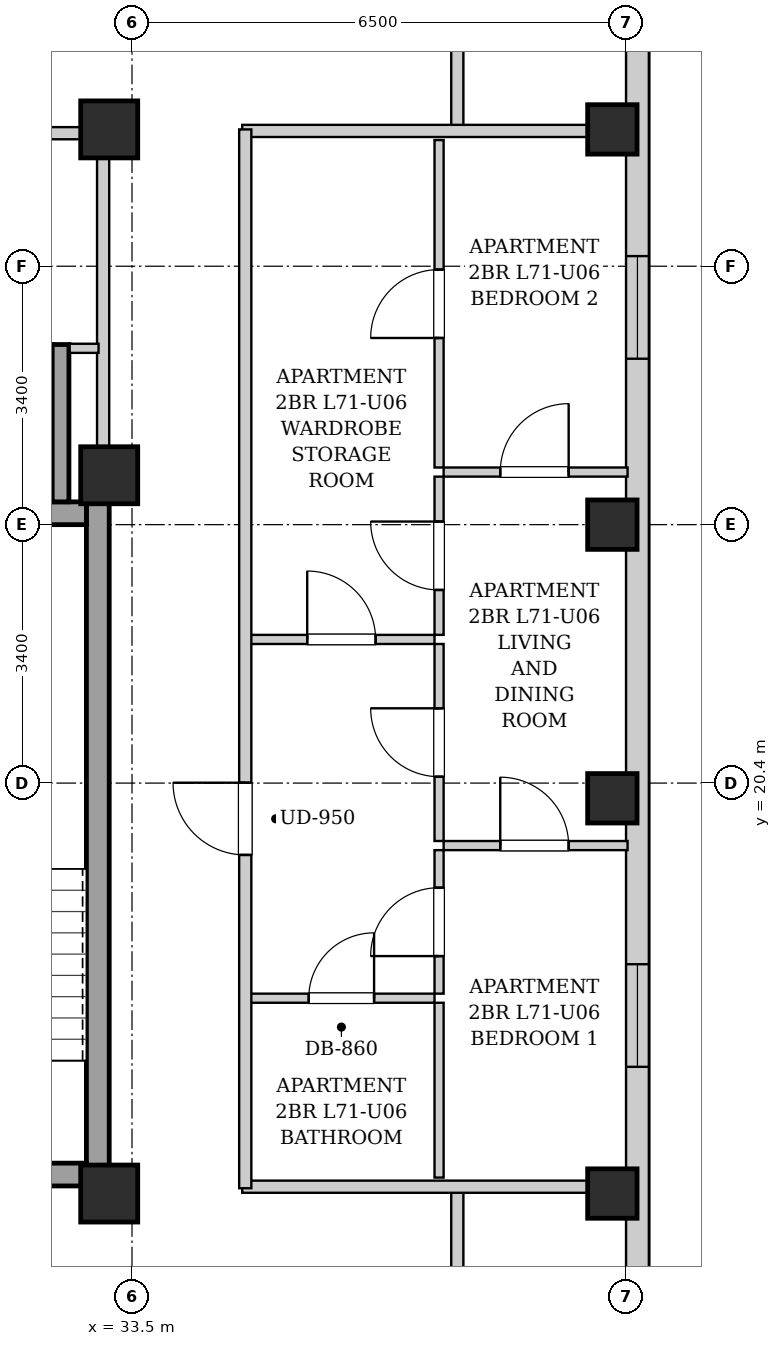
"""IFC4 building model, lengths in metres.
Left out: names, types, materials, properties, quantities, classifications, styles, units other than length and angle.
Written with IfcOpenShell. Run it as: python <this file> out.ifc"""

import sys

from ifc_helpers import new_model, si_unit, direction, frame, frame_2d, origin, origin_2d, place, context, subcontext, project, spatial, rectangle, extrude, element, fill, save


model = new_model("IFC4")
c1 = context("Model", 3, precision=1e-05, world=origin(), true_north=direction((0.0, 1.0)))
c2 = subcontext(c1, "Body", "Model", "MODEL_VIEW")
j1 = project(units=[si_unit("LENGTHUNIT", "METRE"), si_unit("PLANEANGLEUNIT", "RADIAN")], contexts=[c1])
p1 = place(None, origin())
s1 = spatial("IfcSite", under=j1, at=p1, CompositionType="ELEMENT")
p2 = place(p1, origin())
s2 = spatial("IfcBuilding", under=s1, at=p2, CompositionType="ELEMENT")
p3 = place(p2, frame((0.0, 0.0, 244.5)))
s3 = spatial("IfcBuildingStorey", under=s2, at=p3, CompositionType="ELEMENT", Elevation=244.5)
for number, where, z_axis, x_axis in (
    (1, (39.82, 15.0, 0.0), (0.0, 0.0, 1.0), (1.0, 0.0, 0.0)),
    (2, (39.82, 20.2, 0.0), (0.0, 0.0, 1.0), (1.0, 0.0, 0.0)),
    (3, (39.82, 23.8, 0.0), (0.0, 0.0, 1.0), (1.0, 0.0, 0.0)),
    (4, (39.82, 29.0, 0.0), (0.0, 0.0, 1.0), (1.0, 0.0, 0.0)),
):
    element("IfcColumn", number, at=place(p3, frame(where, z_axis=z_axis, x_axis=x_axis)), inside=s3, PredefinedType="COLUMN", context=c2, shape_type="SweptSolid", body=[
        extrude(rectangle(XDim=0.65, YDim=0.65, at=origin_2d()), origin(), (0.0, 0.0, 1.0), 3.4),
    ])
for number, where, z_axis, x_axis in (
    (5, (33.2, 15.0, 0.0), (0.0, 0.0, 1.0), (1.0, 0.0, 0.0)),
    (6, (33.2, 29.0, 0.0), (0.0, 0.0, 1.0), (1.0, 0.0, 0.0)),
    (7, (33.2, 24.45, 0.0), (0.0, 0.0, 1.0), (1.0, 0.0, 0.0)),
):
    element("IfcColumn", number, at=place(p3, frame(where, z_axis=z_axis, x_axis=x_axis)), inside=s3, PredefinedType="COLUMN", context=c2, shape_type="SweptSolid", body=[
        extrude(rectangle(XDim=0.75, YDim=0.75, at=origin_2d()), origin(), (0.0, 0.0, 1.0), 3.4),
    ])
p4 = place(p3, frame((40.15, 37.7, 0.0), z_axis=(0.0, 0.0, 1.0), x_axis=(0.0, -1.0, 0.0)))
e8 = element("IfcWall", 8, at=p4, inside=s3, PredefinedType="SOLIDWALL", context=c2, shape_type="SweptSolid", body=[
    extrude(rectangle(XDim=31.4, YDim=0.3, at=frame_2d((15.7, 0.0))), origin(), (0.0, 0.0, 1.0), 3.14),
])
p5 = place(p4, frame((28.396, 0.0, 0.55)))
e9 = element("IfcOpeningElement", 9, at=p5, cuts=e8, PredefinedType="OPENING", context=c2, shape_type="SweptSolid", body=[
    extrude(rectangle(XDim=1.35, YDim=1.2, at=frame_2d((0.675, 0.6))), frame((0.0, 0.16, 0.0), z_axis=(0.0, -1.0, 0.0), x_axis=(1.0, 0.0, 0.0)), (0.0, 0.0, 1.0), 0.32),
])
p6 = place(p4, frame((1.653, 0.0, 0.55)))
e10 = element("IfcOpeningElement", 10, at=p6, cuts=e8, PredefinedType="OPENING", context=c2, shape_type="SweptSolid", body=[
    extrude(rectangle(XDim=1.35, YDim=1.2, at=frame_2d((0.675, 0.6))), frame((0.0, 0.16, 0.0), z_axis=(0.0, -1.0, 0.0), x_axis=(1.0, 0.0, 0.0)), (0.0, 0.0, 1.0), 0.32),
])
p7 = place(p4, frame((19.683, 0.0, 0.55)))
e11 = element("IfcOpeningElement", 11, at=p7, cuts=e8, PredefinedType="OPENING", context=c2, shape_type="SweptSolid", body=[
    extrude(rectangle(XDim=1.35, YDim=1.2, at=frame_2d((0.675, 0.6))), frame((0.0, 0.16, 0.0), z_axis=(0.0, -1.0, 0.0), x_axis=(1.0, 0.0, 0.0)), (0.0, 0.0, 1.0), 0.32),
])
p8 = place(p4, frame((10.367, 0.0, 0.55)))
e12 = element("IfcOpeningElement", 12, at=p8, cuts=e8, PredefinedType="OPENING", context=c2, shape_type="SweptSolid", body=[
    extrude(rectangle(XDim=1.35, YDim=1.2, at=frame_2d((0.675, 0.6))), frame((0.0, 0.16, 0.0), z_axis=(0.0, -1.0, 0.0), x_axis=(1.0, 0.0, 0.0)), (0.0, 0.0, 1.0), 0.32),
])
p9 = place(p3, frame((33.05, 15.1, 0.0), z_axis=(0.0, 0.0, 1.0), x_axis=(0.0, 1.0, 0.0)))
e13 = element("IfcWall", 13, at=p9, inside=s3, PredefinedType="SHEAR", context=c2, shape_type="SweptSolid", body=[
    extrude(rectangle(XDim=9.0, YDim=0.3, at=frame_2d((4.5, 0.0))), origin(), (0.0, 0.0, 1.0), 3.14),
])
p10 = place(p3, frame((30.05, 23.95, 0.0), z_axis=(0.0, 0.0, 1.0), x_axis=(1.0, 0.0, 0.0)))
e14 = element("IfcWall", 14, at=p10, inside=s3, PredefinedType="SHEAR", context=c2, shape_type="SweptSolid", body=[
    extrude(rectangle(XDim=2.85, YDim=0.3, at=frame_2d((1.425, 0.0))), origin(), (0.0, 0.0, 1.0), 3.14),
])
p11 = place(p3, frame((30.05, 15.25, 0.0), z_axis=(0.0, 0.0, 1.0), x_axis=(1.0, 0.0, 0.0)))
e15 = element("IfcWall", 15, at=p11, inside=s3, PredefinedType="SHEAR", context=c2, shape_type="SweptSolid", body=[
    extrude(rectangle(XDim=2.85, YDim=0.3, at=frame_2d((1.425, 0.0))), origin(), (0.0, 0.0, 1.0), 3.14),
])
p12 = place(p11, frame((0.86, 0.0, 0.0)))
e16 = element("IfcOpeningElement", 16, at=p12, cuts=e15, PredefinedType="OPENING", context=c2, shape_type="SweptSolid", body=[
    extrude(rectangle(XDim=1.1, YDim=2.05, at=frame_2d((0.55, 1.025))), frame((0.0, 0.16, 0.0), z_axis=(0.0, -1.0, 0.0), x_axis=(1.0, 0.0, 0.0)), (0.0, 0.0, 1.0), 0.32),
])
p13 = place(p3, frame((32.56, 24.1, 0.0), z_axis=(0.0, 0.0, 1.0), x_axis=(0.0, 1.0, 0.0)))
e17 = element("IfcWall", 17, at=p13, inside=s3, PredefinedType="SHEAR", context=c2, shape_type="SweptSolid", body=[
    extrude(rectangle(XDim=2.07, YDim=0.22, at=frame_2d((1.035, 0.0))), origin(), (0.0, 0.0, 1.0), 3.14),
])
p14 = place(p3, frame((33.12, 24.12, 0.0), z_axis=(0.0, 0.0, 1.0), x_axis=(0.0, 1.0, 0.0)))
e18 = element("IfcWall", 18, at=p14, inside=s3, PredefinedType="PARTITIONING", context=c2, shape_type="SweptSolid", body=[
    extrude(rectangle(XDim=4.76, YDim=0.16, at=frame_2d((2.38, 0.0))), origin(), (0.0, 0.0, 1.0), 3.14),
])
p15 = place(p3, frame((32.68, 26.12, 0.0), z_axis=(0.0, 0.0, 1.0), x_axis=(1.0, 0.0, 0.0)))
e19 = element("IfcWall", 19, at=p15, inside=s3, PredefinedType="PARTITIONING", context=c2, shape_type="SweptSolid", body=[
    extrude(rectangle(XDim=0.38, YDim=0.12, at=frame_2d((0.19, 0.0))), origin(), (0.0, 0.0, 1.0), 3.14),
])
p16 = place(p3, frame((30.08, 28.95, 0.0), z_axis=(0.0, 0.0, 1.0), x_axis=(1.0, 0.0, 0.0)))
e20 = element("IfcWall", 20, at=p16, inside=s3, PredefinedType="PARTITIONING", context=c2, shape_type="SweptSolid", body=[
    extrude(rectangle(XDim=2.96, YDim=0.16, at=frame_2d((1.48, 0.0))), origin(), (0.0, 0.0, 1.0), 3.14),
])
p17 = place(p16, frame((1.045, 0.0, 0.0)))
e21 = element("IfcOpeningElement", 21, at=p17, cuts=e20, PredefinedType="OPENING", context=c2, shape_type="SweptSolid", body=[
    extrude(rectangle(XDim=0.86, YDim=2.05, at=frame_2d((0.43, 1.025))), frame((0.0, 0.09, 0.0), z_axis=(0.0, -1.0, 0.0), x_axis=(1.0, 0.0, 0.0)), (0.0, 0.0, 1.0), 0.18),
])
for number, where, z_axis, x_axis in (
    (22, (37.78, 13.51, 0.0), (0.0, 0.0, 1.0), (0.0, 1.0, 0.0)),
    (23, (37.78, 28.98, 0.0), (0.0, 0.0, 1.0), (0.0, 1.0, 0.0)),
):
    element("IfcWall", number, at=place(p3, frame(where, z_axis=z_axis, x_axis=x_axis)), inside=s3, PredefinedType="PARTITIONING", context=c2, shape_type="SweptSolid", body=[
        extrude(rectangle(XDim=1.58, YDim=0.16, at=frame_2d((0.79, 0.0))), origin(), (0.0, 0.0, 1.0), 3.14),
    ])
for number, where, z_axis, x_axis in (
    (24, (34.95, 15.09, 0.0), (0.0, 0.0, 1.0), (1.0, 0.0, 0.0)),
    (25, (34.95, 28.98, 0.0), (0.0, 0.0, 1.0), (1.0, 0.0, 0.0)),
):
    element("IfcWall", number, at=place(p3, frame(where, z_axis=z_axis, x_axis=x_axis)), inside=s3, PredefinedType="PARTITIONING", context=c2, shape_type="SweptSolid", body=[
        extrude(rectangle(XDim=5.07, YDim=0.16, at=frame_2d((2.535, 0.0))), origin(), (0.0, 0.0, 1.0), 2.668),
    ])
p18 = place(p3, frame((35.03, 22.29, 0.0), z_axis=(0.0, 0.0, 1.0), x_axis=(1.0, 0.0, 0.0)))
e26 = element("IfcWall", 26, at=p18, inside=s3, PredefinedType="PARTITIONING", context=c2, shape_type="SweptSolid", body=[
    extrude(rectangle(XDim=2.45, YDim=0.12, at=frame_2d((1.225, 0.0))), origin(), (0.0, 0.0, 1.0), 3.14),
])
p19 = place(p18, frame((0.775, 0.0, 0.0)))
e27 = element("IfcOpeningElement", 27, at=p19, cuts=e26, PredefinedType="OPENING", context=c2, shape_type="SweptSolid", body=[
    extrude(rectangle(XDim=0.9, YDim=2.05, at=frame_2d((0.45, 1.025))), frame((0.0, 0.07, 0.0), z_axis=(0.0, -1.0, 0.0), x_axis=(1.0, 0.0, 0.0)), (0.0, 0.0, 1.0), 0.14),
])
p20 = place(p3, frame((37.54, 22.35, 0.0), z_axis=(0.0, 0.0, 1.0), x_axis=(0.0, 1.0, 0.0)))
e28 = element("IfcWall", 28, at=p20, inside=s3, PredefinedType="PARTITIONING", context=c2, shape_type="SweptSolid", body=[
    extrude(rectangle(XDim=2.082, YDim=0.12, at=frame_2d((1.041, 0.0))), origin(), (0.0, 0.0, 1.0), 3.14),
])
p21 = place(p20, frame((0.591, 0.0, 0.0)))
e29 = element("IfcOpeningElement", 29, at=p21, cuts=e28, PredefinedType="OPENING", context=c2, shape_type="SweptSolid", body=[
    extrude(rectangle(XDim=0.9, YDim=2.05, at=frame_2d((0.45, 1.025))), frame((0.0, 0.07, 0.0), z_axis=(0.0, -1.0, 0.0), x_axis=(1.0, 0.0, 0.0)), (0.0, 0.0, 1.0), 0.14),
])
p22 = place(p3, frame((37.54, 24.552, 0.0), z_axis=(0.0, 0.0, 1.0), x_axis=(0.0, 1.0, 0.0)))
e30 = element("IfcWall", 30, at=p22, inside=s3, PredefinedType="PARTITIONING", context=c2, shape_type="SweptSolid", body=[
    extrude(rectangle(XDim=4.308, YDim=0.12, at=frame_2d((2.154, 0.0))), origin(), (0.0, 0.0, 1.0), 3.14),
])
p23 = place(p22, frame((1.704, 0.0, 0.0)))
e31 = element("IfcOpeningElement", 31, at=p23, cuts=e30, PredefinedType="OPENING", context=c2, shape_type="SweptSolid", body=[
    extrude(rectangle(XDim=0.9, YDim=2.05, at=frame_2d((0.45, 1.025))), frame((0.0, 0.07, 0.0), z_axis=(0.0, -1.0, 0.0), x_axis=(1.0, 0.0, 0.0)), (0.0, 0.0, 1.0), 0.14),
])
p24 = place(p3, frame((35.03, 17.57, 0.0), z_axis=(0.0, 0.0, 1.0), x_axis=(1.0, 0.0, 0.0)))
e32 = element("IfcWall", 32, at=p24, inside=s3, PredefinedType="PARTITIONING", context=c2, shape_type="SweptSolid", body=[
    extrude(rectangle(XDim=2.45, YDim=0.12, at=frame_2d((1.225, 0.0))), origin(), (0.0, 0.0, 1.0), 3.14),
])
p25 = place(p24, frame((0.795, 0.0, 0.0)))
e33 = element("IfcOpeningElement", 33, at=p25, cuts=e32, PredefinedType="OPENING", context=c2, shape_type="SweptSolid", body=[
    extrude(rectangle(XDim=0.86, YDim=2.05, at=frame_2d((0.43, 1.025))), frame((0.0, 0.07, 0.0), z_axis=(0.0, -1.0, 0.0), x_axis=(1.0, 0.0, 0.0)), (0.0, 0.0, 1.0), 0.14),
])
p26 = place(p3, frame((37.54, 15.21, 0.0), z_axis=(0.0, 0.0, 1.0), x_axis=(0.0, 1.0, 0.0)))
e34 = element("IfcWall", 34, at=p26, inside=s3, PredefinedType="PARTITIONING", context=c2, shape_type="SweptSolid", body=[
    extrude(rectangle(XDim=2.3, YDim=0.12, at=frame_2d((1.15, 0.0))), origin(), (0.0, 0.0, 1.0), 3.14),
])
p27 = place(p3, frame((37.54, 17.63, 0.0), z_axis=(0.0, 0.0, 1.0), x_axis=(0.0, 1.0, 0.0)))
e35 = element("IfcWall", 35, at=p27, inside=s3, PredefinedType="PARTITIONING", context=c2, shape_type="SweptSolid", body=[
    extrude(rectangle(XDim=1.888, YDim=0.12, at=frame_2d((0.944, 0.0))), origin(), (0.0, 0.0, 1.0), 3.14),
])
p28 = place(p27, frame((0.494, 0.0, 0.0)))
e36 = element("IfcOpeningElement", 36, at=p28, cuts=e35, PredefinedType="OPENING", context=c2, shape_type="SweptSolid", body=[
    extrude(rectangle(XDim=0.9, YDim=2.05, at=frame_2d((0.45, 1.025))), frame((0.0, 0.07, 0.0), z_axis=(0.0, -1.0, 0.0), x_axis=(1.0, 0.0, 0.0)), (0.0, 0.0, 1.0), 0.14),
])
p29 = place(p3, frame((37.54, 19.638, 0.0), z_axis=(0.0, 0.0, 1.0), x_axis=(0.0, 1.0, 0.0)))
e37 = element("IfcWall", 37, at=p29, inside=s3, PredefinedType="PARTITIONING", context=c2, shape_type="SweptSolid", body=[
    extrude(rectangle(XDim=2.592, YDim=0.12, at=frame_2d((1.296, 0.0))), origin(), (0.0, 0.0, 1.0), 3.14),
])
p30 = place(p29, frame((0.846, 0.0, 0.0)))
e38 = element("IfcOpeningElement", 38, at=p30, cuts=e37, PredefinedType="OPENING", context=c2, shape_type="SweptSolid", body=[
    extrude(rectangle(XDim=0.9, YDim=2.05, at=frame_2d((0.45, 1.025))), frame((0.0, 0.07, 0.0), z_axis=(0.0, -1.0, 0.0), x_axis=(1.0, 0.0, 0.0)), (0.0, 0.0, 1.0), 0.14),
])
p31 = place(p3, frame((37.6, 19.578, 0.0), z_axis=(0.0, 0.0, 1.0), x_axis=(1.0, 0.0, 0.0)))
e39 = element("IfcWall", 39, at=p31, inside=s3, PredefinedType="PARTITIONING", context=c2, shape_type="SweptSolid", body=[
    extrude(rectangle(XDim=2.42, YDim=0.12, at=frame_2d((1.21, 0.0))), origin(), (0.0, 0.0, 1.0), 3.14),
])
p32 = place(p31, frame((0.745, 0.0, 0.0)))
e40 = element("IfcOpeningElement", 40, at=p32, cuts=e39, PredefinedType="OPENING", context=c2, shape_type="SweptSolid", body=[
    extrude(rectangle(XDim=0.9, YDim=2.05, at=frame_2d((0.45, 1.025))), frame((0.0, 0.07, 0.0), z_axis=(0.0, -1.0, 0.0), x_axis=(1.0, 0.0, 0.0)), (0.0, 0.0, 1.0), 0.14),
])
p33 = place(p3, frame((37.6, 24.492, 0.0), z_axis=(0.0, 0.0, 1.0), x_axis=(1.0, 0.0, 0.0)))
e41 = element("IfcWall", 41, at=p33, inside=s3, PredefinedType="PARTITIONING", context=c2, shape_type="SweptSolid", body=[
    extrude(rectangle(XDim=2.42, YDim=0.12, at=frame_2d((1.21, 0.0))), origin(), (0.0, 0.0, 1.0), 2.878),
])
p34 = place(p33, frame((0.745, 0.0, 0.0)))
e42 = element("IfcOpeningElement", 42, at=p34, cuts=e41, PredefinedType="OPENING", context=c2, shape_type="SweptSolid", body=[
    extrude(rectangle(XDim=0.9, YDim=2.05, at=frame_2d((0.45, 1.025))), frame((0.0, 0.07, 0.0), z_axis=(0.0, -1.0, 0.0), x_axis=(1.0, 0.0, 0.0)), (0.0, 0.0, 1.0), 0.14),
])
p35 = place(p3, frame((34.99, 15.07, 0.0), z_axis=(0.0, 0.0, 1.0), x_axis=(0.0, 1.0, 0.0)))
e43 = element("IfcWall", 43, at=p35, inside=s3, PredefinedType="PARTITIONING", context=c2, shape_type="SweptSolid", body=[
    extrude(rectangle(XDim=13.93, YDim=0.16, at=frame_2d((6.965, 0.0))), origin(), (0.0, 0.0, 1.0), 3.14),
])
p36 = place(p35, frame((4.385, 0.0, 0.0)))
e44 = element("IfcOpeningElement", 44, at=p36, cuts=e43, PredefinedType="OPENING", context=c2, shape_type="SweptSolid", body=[
    extrude(rectangle(XDim=0.95, YDim=2.1, at=frame_2d((0.475, 1.05))), frame((0.0, 0.09, 0.0), z_axis=(0.0, -1.0, 0.0), x_axis=(1.0, 0.0, 0.0)), (0.0, 0.0, 1.0), 0.18),
])
p37 = place(p19, origin())
e45 = element("IfcDoor", 45, at=p37, inside=s3, OperationType="SINGLE_SWING_LEFT", PredefinedType="DOOR", context=c2, shape_type="SweptSolid", body=[
    extrude(rectangle(XDim=0.9, YDim=2.05, at=frame_2d((0.45, 1.025))), frame((0.0, 0.025, 0.0), z_axis=(0.0, -1.0, 0.0), x_axis=(1.0, 0.0, 0.0)), (0.0, 0.0, 1.0), 0.05),
])
fill(e27, e45)
p38 = place(p21, origin())
e46 = element("IfcDoor", 46, at=p38, inside=s3, OperationType="SINGLE_SWING_RIGHT", PredefinedType="DOOR", context=c2, shape_type="SweptSolid", body=[
    extrude(rectangle(XDim=0.9, YDim=2.05, at=frame_2d((0.45, 1.025))), frame((0.0, 0.025, 0.0), z_axis=(0.0, -1.0, 0.0), x_axis=(1.0, 0.0, 0.0)), (0.0, 0.0, 1.0), 0.05),
])
fill(e29, e46)
p39 = place(p23, origin())
e47 = element("IfcDoor", 47, at=p39, inside=s3, OperationType="SINGLE_SWING_LEFT", PredefinedType="DOOR", context=c2, shape_type="SweptSolid", body=[
    extrude(rectangle(XDim=0.9, YDim=2.05, at=frame_2d((0.45, 1.025))), frame((0.0, 0.025, 0.0), z_axis=(0.0, -1.0, 0.0), x_axis=(1.0, 0.0, 0.0)), (0.0, 0.0, 1.0), 0.05),
])
fill(e31, e47)
p40 = place(p25, origin())
e48 = element("IfcDoor", 48, at=p40, inside=s3, OperationType="SINGLE_SWING_RIGHT", PredefinedType="DOOR", context=c2, shape_type="SweptSolid", body=[
    extrude(rectangle(XDim=0.86, YDim=2.05, at=frame_2d((0.43, 1.025))), frame((0.0, 0.025, 0.0), z_axis=(0.0, -1.0, 0.0), x_axis=(1.0, 0.0, 0.0)), (0.0, 0.0, 1.0), 0.05),
])
fill(e33, e48)
p41 = place(p28, origin())
e49 = element("IfcDoor", 49, at=p41, inside=s3, OperationType="SINGLE_SWING_LEFT", PredefinedType="DOOR", context=c2, shape_type="SweptSolid", body=[
    extrude(rectangle(XDim=0.9, YDim=2.05, at=frame_2d((0.45, 1.025))), frame((0.0, 0.025, 0.0), z_axis=(0.0, -1.0, 0.0), x_axis=(1.0, 0.0, 0.0)), (0.0, 0.0, 1.0), 0.05),
])
fill(e36, e49)
p42 = place(p30, origin())
e50 = element("IfcDoor", 50, at=p42, inside=s3, OperationType="SINGLE_SWING_RIGHT", PredefinedType="DOOR", context=c2, shape_type="SweptSolid", body=[
    extrude(rectangle(XDim=0.9, YDim=2.05, at=frame_2d((0.45, 1.025))), frame((0.0, 0.025, 0.0), z_axis=(0.0, -1.0, 0.0), x_axis=(1.0, 0.0, 0.0)), (0.0, 0.0, 1.0), 0.05),
])
fill(e38, e50)
p43 = place(p32, origin())
e51 = element("IfcDoor", 51, at=p43, inside=s3, OperationType="SINGLE_SWING_LEFT", PredefinedType="DOOR", context=c2, shape_type="SweptSolid", body=[
    extrude(rectangle(XDim=0.9, YDim=2.05, at=frame_2d((0.45, 1.025))), frame((0.0, 0.025, 0.0), z_axis=(0.0, -1.0, 0.0), x_axis=(1.0, 0.0, 0.0)), (0.0, 0.0, 1.0), 0.05),
])
fill(e40, e51)
p44 = place(p34, origin())
e52 = element("IfcDoor", 52, at=p44, inside=s3, OperationType="SINGLE_SWING_RIGHT", PredefinedType="DOOR", context=c2, shape_type="SweptSolid", body=[
    extrude(rectangle(XDim=0.9, YDim=2.05, at=frame_2d((0.45, 1.025))), frame((0.0, 0.025, 0.0), z_axis=(0.0, -1.0, 0.0), x_axis=(1.0, 0.0, 0.0)), (0.0, 0.0, 1.0), 0.05),
])
fill(e42, e52)
p45 = place(p36, origin())
e53 = element("IfcDoor", 53, at=p45, inside=s3, OperationType="SINGLE_SWING_RIGHT", PredefinedType="DOOR", context=c2, shape_type="SweptSolid", body=[
    extrude(rectangle(XDim=0.95, YDim=2.1, at=frame_2d((0.475, 1.05))), frame((0.0, 0.025, 0.0), z_axis=(0.0, -1.0, 0.0), x_axis=(1.0, 0.0, 0.0)), (0.0, 0.0, 1.0), 0.05),
])
fill(e44, e53)
p46 = place(p7, origin())
e54 = element("IfcWindow", 54, at=p46, inside=s3, PartitioningType="SINGLE_PANEL", PredefinedType="WINDOW", context=c2, shape_type="SweptSolid", body=[
    extrude(rectangle(XDim=1.35, YDim=1.2, at=frame_2d((0.675, 0.6))), frame((0.0, 0.03, 0.0), z_axis=(0.0, -1.0, 0.0), x_axis=(1.0, 0.0, 0.0)), (0.0, 0.0, 1.0), 0.06),
])
fill(e11, e54)
p47 = place(p8, origin())
e55 = element("IfcWindow", 55, at=p47, inside=s3, PartitioningType="SINGLE_PANEL", PredefinedType="WINDOW", context=c2, shape_type="SweptSolid", body=[
    extrude(rectangle(XDim=1.35, YDim=1.2, at=frame_2d((0.675, 0.6))), frame((0.0, 0.03, 0.0), z_axis=(0.0, -1.0, 0.0), x_axis=(1.0, 0.0, 0.0)), (0.0, 0.0, 1.0), 0.06),
])
fill(e12, e55)
save(model, sys.argv[1])
